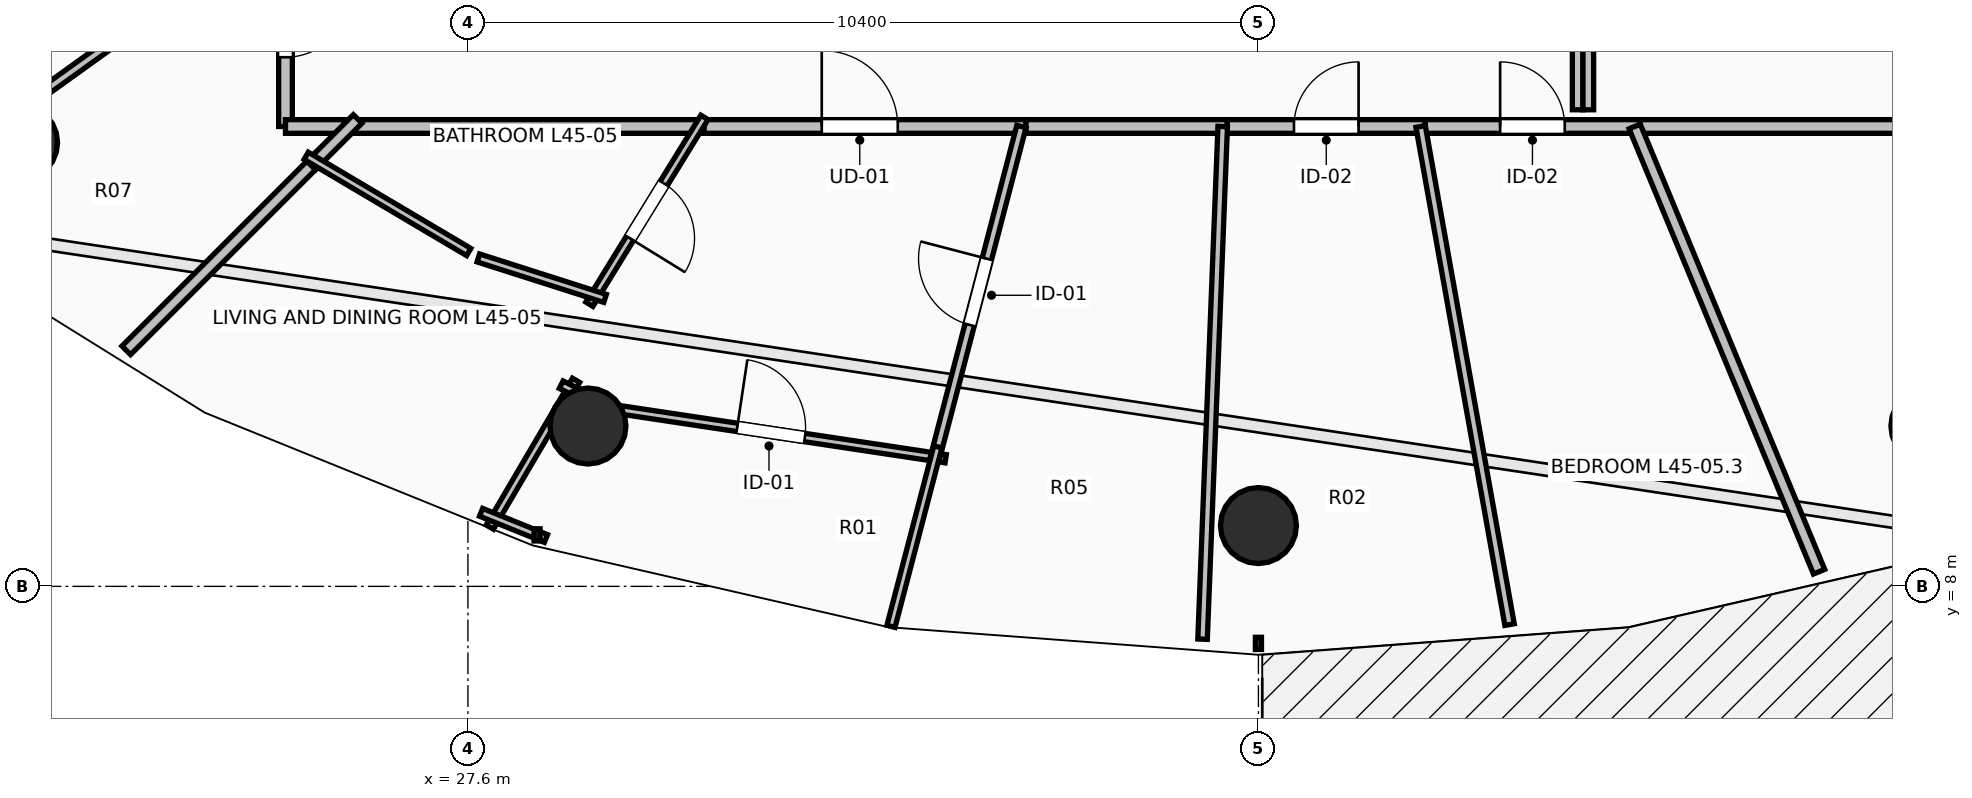
"""IFC4 building model, lengths in metres.
Left out: names, types, materials, properties, quantities, classifications, styles, units other than length and angle.
Written with IfcOpenShell. Run it as: python <this file> out.ifc"""

import sys

from ifc_helpers import new_model, si_unit, direction, frame, frame_2d, origin, origin_2d, place, context, subcontext, project, spatial, rectangle, circle, extrude, element, fill, save


model = new_model("IFC4")
c1 = context("Model", 3, precision=1e-05, world=origin(), true_north=direction((0.0, 1.0)))
c2 = subcontext(c1, "Body", "Model", "MODEL_VIEW")
j1 = project(units=[si_unit("LENGTHUNIT", "METRE"), si_unit("PLANEANGLEUNIT", "RADIAN")], contexts=[c1])
p1 = place(None, origin())
s1 = spatial("IfcSite", under=j1, at=p1, CompositionType="ELEMENT")
p2 = place(p1, origin())
s2 = spatial("IfcBuilding", under=s1, at=p2, CompositionType="ELEMENT")
p3 = place(p2, frame((0.0, 0.0, 167.6)))
s3 = spatial("IfcBuildingStorey", under=s2, at=p3, CompositionType="ELEMENT", Elevation=167.6)
for number, where, z_axis, x_axis in (
    (1, (21.701, 13.838, 0.0), (0.0, 0.0, 1.0), (-0.707, -0.707, 0.0)),
    (2, (29.179, 10.109, 0.0), (0.0, 0.0, 1.0), (-0.383, -0.924, 0.0)),
    (3, (38.0, 8.8, 0.0), (0.0, 0.0, 1.0), (0.0, -1.0, 0.0)),
    (4, (46.821, 10.109, 0.0), (0.0, 0.0, 1.0), (0.383, -0.924, 0.0)),
):
    element("IfcColumn", number, at=place(p3, frame(where, z_axis=z_axis, x_axis=x_axis)), inside=s3, PredefinedType="COLUMN", context=c2, shape_type="SweptSolid", body=[
        extrude(circle(Radius=0.5, at=origin_2d()), origin(), (0.0, 0.0, 1.0), 3.5),
    ])
p4 = place(p3, frame((25.2, 16.722, 0.0), z_axis=(0.0, 0.0, 1.0), x_axis=(0.0, -1.0, 0.0)))
e5 = element("IfcWall", 5, at=p4, inside=s3, PredefinedType="PARTITIONING", context=c2, shape_type="SweptSolid", body=[
    extrude(rectangle(XDim=2.672, YDim=0.18, at=frame_2d((1.336, 0.0))), origin(), (0.0, 0.0, 1.0), 2.432),
])
p5 = place(p4, frame((0.911, 0.0, 0.0)))
e6 = element("IfcOpeningElement", 6, at=p5, cuts=e5, PredefinedType="OPENING", context=c2, shape_type="SweptSolid", body=[
    extrude(rectangle(XDim=0.85, YDim=2.1, at=frame_2d((0.425, 1.05))), frame((0.0, 0.105, 0.0), z_axis=(0.0, -1.0, 0.0), x_axis=(1.0, 0.0, 0.0)), (0.0, 0.0, 1.0), 0.21),
])
p6 = place(p3, frame((25.2, 14.05, 0.0), z_axis=(0.0, 0.0, 1.0), x_axis=(1.0, 0.0, 0.0)))
e7 = element("IfcWall", 7, at=p6, inside=s3, PredefinedType="PARTITIONING", context=c2, shape_type="SweptSolid", body=[
    extrude(rectangle(XDim=0.91, YDim=0.18, at=frame_2d((0.455, 0.0))), origin(), (0.0, 0.0, 1.0), 2.929),
])
p7 = place(p3, frame((30.568, 14.05, 0.0), z_axis=(0.0, 0.0, 1.0), x_axis=(1.0, 0.0, 0.0)))
e8 = element("IfcWall", 8, at=p7, inside=s3, PredefinedType="PARTITIONING", context=c2, shape_type="SweptSolid", body=[
    extrude(rectangle(XDim=4.374, YDim=0.18, at=frame_2d((2.187, 0.0))), origin(), (0.0, 0.0, 1.0), 2.874),
])
p8 = place(p7, frame((1.687, 0.0, 0.0)))
e9 = element("IfcOpeningElement", 9, at=p8, cuts=e8, PredefinedType="OPENING", context=c2, shape_type="SweptSolid", body=[
    extrude(rectangle(XDim=1.0, YDim=2.15, at=frame_2d((0.5, 1.075))), frame((0.0, 0.105, 0.0), z_axis=(0.0, -1.0, 0.0), x_axis=(1.0, 0.0, 0.0)), (0.0, 0.0, 1.0), 0.21),
])
p9 = place(p3, frame((25.97, 14.05, 0.0), z_axis=(0.0, 0.0, 1.0), x_axis=(1.0, 0.0, 0.0)))
e10 = element("IfcWall", 10, at=p9, inside=s3, PredefinedType="PARTITIONING", context=c2, shape_type="SweptSolid", body=[
    extrude(rectangle(XDim=4.738, YDim=0.18, at=frame_2d((2.369, 0.0))), origin(), (0.0, 0.0, 1.0), 2.432),
])
p10 = place(p3, frame((34.942, 14.05, 0.0), z_axis=(0.0, 0.0, 1.0), x_axis=(1.0, 0.0, 0.0)))
e11 = element("IfcWall", 11, at=p10, inside=s3, PredefinedType="PARTITIONING", context=c2, shape_type="SweptSolid", body=[
    extrude(rectangle(XDim=2.648, YDim=0.18, at=frame_2d((1.324, 0.0))), origin(), (0.0, 0.0, 1.0), 2.874),
])
p11 = place(p3, frame((37.59, 14.05, 0.0), z_axis=(0.0, 0.0, 1.0), x_axis=(1.0, 0.0, 0.0)))
e12 = element("IfcWall", 12, at=p11, inside=s3, PredefinedType="PARTITIONING", context=c2, shape_type="SweptSolid", body=[
    extrude(rectangle(XDim=2.605, YDim=0.18, at=frame_2d((1.302, 0.0))), origin(), (0.0, 0.0, 1.0), 2.874),
])
p12 = place(p11, frame((0.877, 0.0, 0.0)))
e13 = element("IfcOpeningElement", 13, at=p12, cuts=e12, PredefinedType="OPENING", context=c2, shape_type="SweptSolid", body=[
    extrude(rectangle(XDim=0.85, YDim=2.1, at=frame_2d((0.425, 1.05))), frame((0.0, 0.105, 0.0), z_axis=(0.0, -1.0, 0.0), x_axis=(1.0, 0.0, 0.0)), (0.0, 0.0, 1.0), 0.21),
])
p13 = place(p3, frame((40.195, 14.05, 0.0), z_axis=(0.0, 0.0, 1.0), x_axis=(1.0, 0.0, 0.0)))
e14 = element("IfcWall", 14, at=p13, inside=s3, PredefinedType="PARTITIONING", context=c2, shape_type="SweptSolid", body=[
    extrude(rectangle(XDim=2.82, YDim=0.18, at=frame_2d((1.41, 0.0))), origin(), (0.0, 0.0, 1.0), 2.874),
])
p14 = place(p13, frame((0.985, 0.0, 0.0)))
e15 = element("IfcOpeningElement", 15, at=p14, cuts=e14, PredefinedType="OPENING", context=c2, shape_type="SweptSolid", body=[
    extrude(rectangle(XDim=0.85, YDim=2.1, at=frame_2d((0.425, 1.05))), frame((0.0, 0.105, 0.0), z_axis=(0.0, -1.0, 0.0), x_axis=(1.0, 0.0, 0.0)), (0.0, 0.0, 1.0), 0.21),
])
p15 = place(p3, frame((43.015, 14.05, 0.0), z_axis=(0.0, 0.0, 1.0), x_axis=(1.0, 0.0, 0.0)))
e16 = element("IfcWall", 16, at=p15, inside=s3, PredefinedType="PARTITIONING", context=c2, shape_type="SweptSolid", body=[
    extrude(rectangle(XDim=7.785, YDim=0.18, at=frame_2d((3.893, 0.0))), origin(), (0.0, 0.0, 1.0), 2.432),
])
p16 = place(p3, frame((20.069, 13.106, 0.0), z_axis=(0.0, 0.0, 1.0), x_axis=(0.81185514799, 0.58385890306, 0.0)))
e17 = element("IfcWall", 17, at=p16, inside=s3, PredefinedType="PARTITIONING", context=c2, shape_type="SweptSolid", body=[
    extrude(rectangle(XDim=6.32, YDim=0.125, at=frame_2d((3.16, 0.0))), origin(), (0.0, 0.0, 1.0), 2.432),
])
p17 = place(p3, frame((23.105, 11.105, 0.0), z_axis=(0.0, 0.0, 1.0), x_axis=(0.707106781187, 0.707106781187, 0.0)))
e18 = element("IfcWall", 18, at=p17, inside=s3, PredefinedType="PARTITIONING", context=c2, shape_type="SweptSolid", body=[
    extrude(rectangle(XDim=3.581, YDim=0.16, at=frame_2d((1.791, 0.0))), origin(), (0.0, 0.0, 1.0), 2.728),
])
p18 = place(p3, frame((25.538, 13.538, 0.0), z_axis=(0.0, 0.0, 1.0), x_axis=(0.707106781187, 0.707106781187, 0.0)))
e19 = element("IfcWall", 19, at=p18, inside=s3, PredefinedType="PARTITIONING", context=c2, shape_type="SweptSolid", body=[
    extrude(rectangle(XDim=0.864, YDim=0.16, at=frame_2d((0.432, 0.0))), origin(), (0.0, 0.0, 1.0), 2.929),
])
p19 = place(p3, frame((30.711, 14.169, 0.0), z_axis=(0.0, 0.0, 1.0), x_axis=(-0.524536274856, -0.851388099729, 0.0)))
e20 = element("IfcWall", 20, at=p19, inside=s3, PredefinedType="PARTITIONING", context=c2, shape_type="SweptSolid", body=[
    extrude(rectangle(XDim=2.886, YDim=0.11, at=frame_2d((1.443, 0.0))), origin(), (0.0, 0.0, 1.0), 2.874),
])
p20 = place(p19, frame((1.018, 0.0, 0.0)))
e21 = element("IfcOpeningElement", 21, at=p20, cuts=e20, PredefinedType="OPENING", context=c2, shape_type="SweptSolid", body=[
    extrude(rectangle(XDim=0.85, YDim=2.1, at=frame_2d((0.425, 1.05))), frame((0.0, 0.07, 0.0), z_axis=(0.0, -1.0, 0.0), x_axis=(1.0, 0.0, 0.0)), (0.0, 0.0, 1.0), 0.14),
])
p21 = place(p3, frame((29.404, 11.788, 0.0), z_axis=(0.0, 0.0, 1.0), x_axis=(-0.952663508426, 0.304026708881, 0.0)))
e22 = element("IfcWall", 22, at=p21, inside=s3, PredefinedType="PARTITIONING", context=c2, shape_type="SweptSolid", body=[
    extrude(rectangle(XDim=1.75, YDim=0.11, at=frame_2d((0.875, 0.0))), origin(), (0.0, 0.0, 1.0), 2.432),
])
p22 = place(p3, frame((27.611, 12.399, 0.0), z_axis=(0.0, 0.0, 1.0), x_axis=(-0.860546797705, 0.509371386082, 0.0)))
e23 = element("IfcWall", 23, at=p22, inside=s3, PredefinedType="PARTITIONING", context=c2, shape_type="SweptSolid", body=[
    extrude(rectangle(XDim=2.485, YDim=0.11, at=frame_2d((1.242, 0.0))), origin(), (0.0, 0.0, 1.0), 2.929),
])
p23 = place(p3, frame((27.888, 8.779, 0.0), z_axis=(0.0, 0.0, 1.0), x_axis=(0.506572342253, 0.86219746118, 0.0)))
e24 = element("IfcWall", 24, at=p23, inside=s3, PredefinedType="PARTITIONING", context=c2, shape_type="SweptSolid", body=[
    extrude(rectangle(XDim=2.24, YDim=0.11, at=frame_2d((1.12, 0.0))), origin(), (0.0, 0.0, 1.0), 2.432),
])
p24 = place(p3, frame((28.827, 10.653, 0.0), z_axis=(0.0, 0.0, 1.0), x_axis=(0.892195428052, -0.451649552378, 0.0)))
e25 = element("IfcWall", 25, at=p24, inside=s3, PredefinedType="PARTITIONING", context=c2, shape_type="SweptSolid", body=[
    extrude(rectangle(XDim=0.813, YDim=0.11, at=frame_2d((0.407, 0.0))), origin(), (0.0, 0.0, 1.0), 2.432),
])
p25 = place(p3, frame((29.29, 10.37, 0.0), z_axis=(0.0, 0.0, 1.0), x_axis=(0.988895858235, -0.148610166425, 0.0)))
e26 = element("IfcWall", 26, at=p25, inside=s3, PredefinedType="PARTITIONING", context=c2, shape_type="SweptSolid", body=[
    extrude(rectangle(XDim=4.647, YDim=0.11, at=frame_2d((2.324, 0.0))), origin(), (0.0, 0.0, 1.0), 3.24),
])
p26 = place(p25, frame((1.874, 0.0, 0.0)))
e27 = element("IfcOpeningElement", 27, at=p26, cuts=e26, PredefinedType="OPENING", context=c2, shape_type="SweptSolid", body=[
    extrude(rectangle(XDim=0.9, YDim=2.1, at=frame_2d((0.45, 1.05))), frame((0.0, 0.07, 0.0), z_axis=(0.0, -1.0, 0.0), x_axis=(1.0, 0.0, 0.0)), (0.0, 0.0, 1.0), 0.14),
])
p27 = place(p3, frame((27.773, 8.974, 0.0), z_axis=(0.0, 0.0, 1.0), x_axis=(0.927227668606, -0.374498131599, 0.0)))
e28 = element("IfcWall", 28, at=p27, inside=s3, PredefinedType="PARTITIONING", context=c2, shape_type="SweptSolid", body=[
    extrude(rectangle(XDim=0.92, YDim=0.11, at=frame_2d((0.46, 0.0))), origin(), (0.0, 0.0, 1.0), 3.24),
])
p28 = place(p3, frame((33.747, 9.7, 0.0), z_axis=(0.0, 0.0, 1.0), x_axis=(0.252463899176, 0.967606314372, 0.0)))
e29 = element("IfcWall", 29, at=p28, inside=s3, PredefinedType="PARTITIONING", context=c2, shape_type="SweptSolid", body=[
    extrude(rectangle(XDim=4.496, YDim=0.125, at=frame_2d((2.248, 0.0))), origin(), (0.0, 0.0, 1.0), 2.874),
])
p29 = place(p28, frame((1.798, 0.0, 0.0)))
e30 = element("IfcOpeningElement", 30, at=p29, cuts=e29, PredefinedType="OPENING", context=c2, shape_type="SweptSolid", body=[
    extrude(rectangle(XDim=0.9, YDim=2.1, at=frame_2d((0.45, 1.05))), frame((0.0, 0.077, 0.0), z_axis=(0.0, -1.0, 0.0), x_axis=(1.0, 0.0, 0.0)), (0.0, 0.0, 1.0), 0.155),
])
p30 = place(p3, frame((33.166, 7.473, 0.0), z_axis=(0.0, 0.0, 1.0), x_axis=(0.252710924929, 0.967541827737, 0.0)))
e31 = element("IfcWall", 31, at=p30, inside=s3, PredefinedType="PARTITIONING", context=c2, shape_type="SweptSolid", body=[
    extrude(rectangle(XDim=2.441, YDim=0.11, at=frame_2d((1.221, 0.0))), origin(), (0.0, 0.0, 1.0), 2.728),
])
p31 = place(p3, frame((37.265, 7.305, 0.0), z_axis=(0.0, 0.0, 1.0), x_axis=(0.039277615957, 0.99922833671, 0.0)))
e32 = element("IfcWall", 32, at=p31, inside=s3, PredefinedType="PARTITIONING", context=c2, shape_type="SweptSolid", body=[
    extrude(rectangle(XDim=6.75, YDim=0.125, at=frame_2d((3.375, 0.0))), origin(), (0.0, 0.0, 1.0), 2.728),
])
p32 = place(p3, frame((41.304, 7.497, 0.0), z_axis=(0.0, 0.0, 1.0), x_axis=(-0.175753825846, 0.984434148484, 0.0)))
e33 = element("IfcWall", 33, at=p32, inside=s3, PredefinedType="PARTITIONING", context=c2, shape_type="SweptSolid", body=[
    extrude(rectangle(XDim=6.656, YDim=0.125, at=frame_2d((3.328, 0.0))), origin(), (0.0, 0.0, 1.0), 2.432),
])
p33 = place(p3, frame((45.376, 8.193, 0.0), z_axis=(0.0, 0.0, 1.0), x_axis=(-0.382683979298, 0.923879305964, 0.0)))
e34 = element("IfcWall", 34, at=p33, inside=s3, PredefinedType="PARTITIONING", context=c2, shape_type="SweptSolid", body=[
    extrude(rectangle(XDim=6.34, YDim=0.16, at=frame_2d((3.17, 0.0))), origin(), (0.0, 0.0, 1.0), 2.432),
])
for number, where, z_axis, x_axis in (
    (35, (42.2, 16.1, 0.0), (0.0, 0.0, 1.0), (0.0, -1.0, 0.0)),
    (36, (42.34, 14.27, 0.0), (0.0, 0.0, 1.0), (0.0, 1.0, 0.0)),
):
    element("IfcWall", number, at=place(p3, frame(where, z_axis=z_axis, x_axis=x_axis)), inside=s3, PredefinedType="PARTITIONING", context=c2, shape_type="SweptSolid", body=[
        extrude(rectangle(XDim=1.83, YDim=0.14, at=frame_2d((0.915, 0.0))), origin(), (0.0, 0.0, 1.0), 3.24),
    ])
p34 = place(p8, origin())
e37 = element("IfcDoor", 37, at=p34, inside=s3, OperationType="SINGLE_SWING_LEFT", PredefinedType="DOOR", context=c2, shape_type="SweptSolid", body=[
    extrude(rectangle(XDim=1.0, YDim=2.15, at=frame_2d((0.5, 1.075))), frame((0.0, 0.025, 0.0), z_axis=(0.0, -1.0, 0.0), x_axis=(1.0, 0.0, 0.0)), (0.0, 0.0, 1.0), 0.05),
])
fill(e9, e37)
p35 = place(p20, origin())
e38 = element("IfcDoor", 38, at=p35, inside=s3, OperationType="SINGLE_SWING_RIGHT", PredefinedType="DOOR", context=c2, shape_type="SweptSolid", body=[
    extrude(rectangle(XDim=0.85, YDim=2.1, at=frame_2d((0.425, 1.05))), frame((0.0, 0.025, 0.0), z_axis=(0.0, -1.0, 0.0), x_axis=(1.0, 0.0, 0.0)), (0.0, 0.0, 1.0), 0.05),
])
fill(e21, e38)
p36 = place(p26, origin())
e39 = element("IfcDoor", 39, at=p36, inside=s3, OperationType="SINGLE_SWING_LEFT", PredefinedType="DOOR", context=c2, shape_type="SweptSolid", body=[
    extrude(rectangle(XDim=0.9, YDim=2.1, at=frame_2d((0.45, 1.05))), frame((0.0, 0.025, 0.0), z_axis=(0.0, -1.0, 0.0), x_axis=(1.0, 0.0, 0.0)), (0.0, 0.0, 1.0), 0.05),
])
fill(e27, e39)
p37 = place(p29, origin())
e40 = element("IfcDoor", 40, at=p37, inside=s3, OperationType="SINGLE_SWING_RIGHT", PredefinedType="DOOR", context=c2, shape_type="SweptSolid", body=[
    extrude(rectangle(XDim=0.9, YDim=2.1, at=frame_2d((0.45, 1.05))), frame((0.0, 0.025, 0.0), z_axis=(0.0, -1.0, 0.0), x_axis=(1.0, 0.0, 0.0)), (0.0, 0.0, 1.0), 0.05),
])
fill(e30, e40)
p38 = place(p5, origin())
e41 = element("IfcDoor", 41, at=p38, inside=s3, OperationType="SINGLE_SWING_LEFT", PredefinedType="DOOR", context=c2, shape_type="SweptSolid", body=[
    extrude(rectangle(XDim=0.85, YDim=2.1, at=frame_2d((0.425, 1.05))), frame((0.0, 0.025, 0.0), z_axis=(0.0, -1.0, 0.0), x_axis=(1.0, 0.0, 0.0)), (0.0, 0.0, 1.0), 0.05),
])
fill(e6, e41)
p39 = place(p12, origin())
e42 = element("IfcDoor", 42, at=p39, inside=s3, OperationType="SINGLE_SWING_RIGHT", PredefinedType="DOOR", context=c2, shape_type="SweptSolid", body=[
    extrude(rectangle(XDim=0.85, YDim=2.1, at=frame_2d((0.425, 1.05))), frame((0.0, 0.025, 0.0), z_axis=(0.0, -1.0, 0.0), x_axis=(1.0, 0.0, 0.0)), (0.0, 0.0, 1.0), 0.05),
])
fill(e13, e42)
p40 = place(p14, origin())
e43 = element("IfcDoor", 43, at=p40, inside=s3, OperationType="SINGLE_SWING_LEFT", PredefinedType="DOOR", context=c2, shape_type="SweptSolid", body=[
    extrude(rectangle(XDim=0.85, YDim=2.1, at=frame_2d((0.425, 1.05))), frame((0.0, 0.025, 0.0), z_axis=(0.0, -1.0, 0.0), x_axis=(1.0, 0.0, 0.0)), (0.0, 0.0, 1.0), 0.05),
])
fill(e15, e43)
save(model, sys.argv[1])
